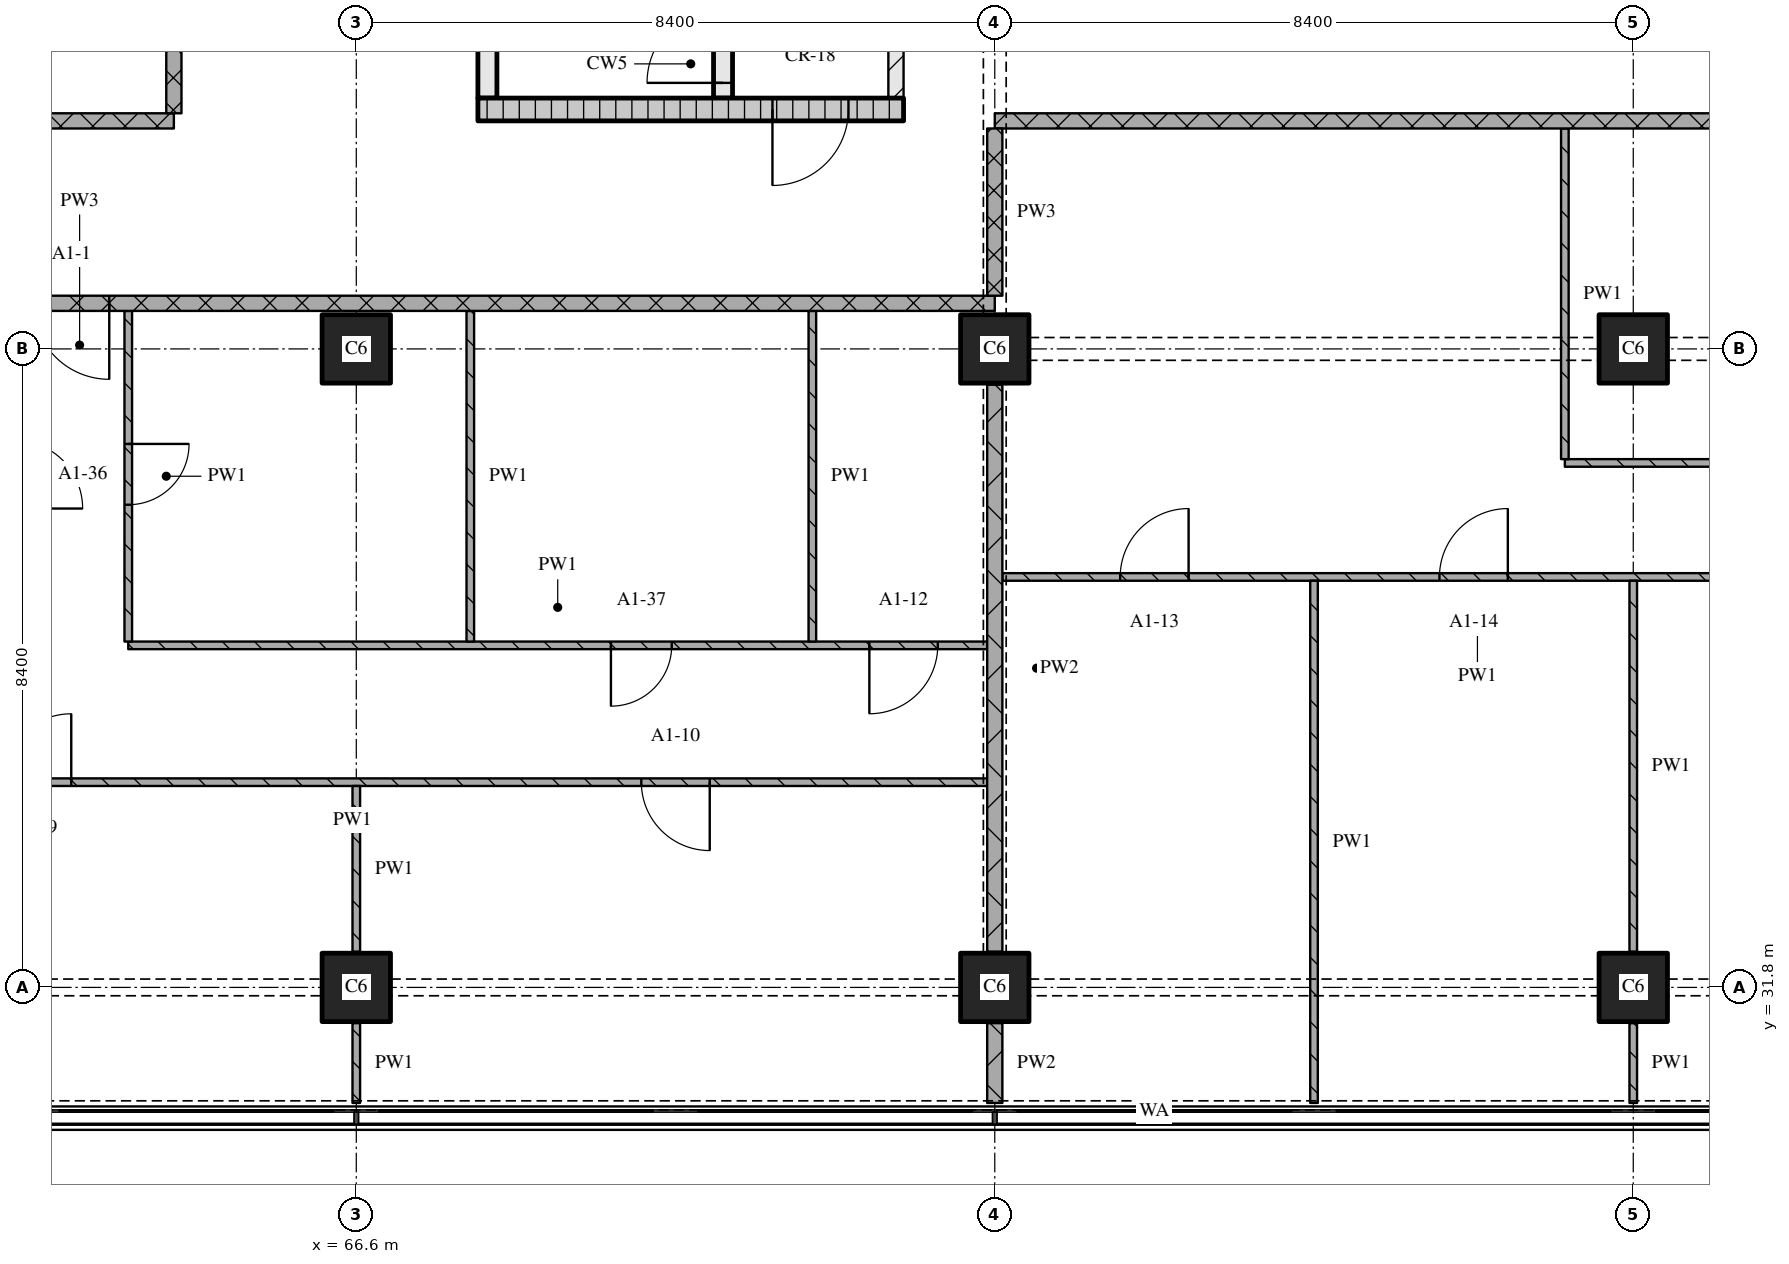
"""IFC4 building model, lengths in metres.
Left out: names, types, materials, properties, quantities, classifications, styles, units other than length and angle.
Written with IfcOpenShell. Run it as: python <this file> out.ifc"""

import sys

from ifc_helpers import new_model, si_unit, direction, frame, frame_2d, origin, origin_2d, place, context, subcontext, project, spatial, rectangle, extrude, element, fill, save


model = new_model("IFC4")
c1 = context("Model", 3, precision=1e-05, world=origin(), true_north=direction((0.0, 1.0)))
c2 = subcontext(c1, "Body", "Model", "MODEL_VIEW")
j1 = project(units=[si_unit("LENGTHUNIT", "METRE"), si_unit("PLANEANGLEUNIT", "RADIAN")], contexts=[c1])
p1 = place(None, origin())
s1 = spatial("IfcSite", under=j1, at=p1, CompositionType="ELEMENT")
p2 = place(p1, origin())
s2 = spatial("IfcBuilding", under=s1, at=p2, CompositionType="ELEMENT")
p3 = place(p2, frame((0.0, 0.0, 40.8)))
s3 = spatial("IfcBuildingStorey", under=s2, at=p3, CompositionType="ELEMENT", Elevation=40.8)
for number, where, z_axis, x_axis in (
    (1, (66.6, 31.8, 0.0), (0.0, 0.0, 1.0), (1.0, 0.0, 0.0)),
    (2, (66.6, 40.2, 0.0), (0.0, 0.0, 1.0), (1.0, 0.0, 0.0)),
    (3, (75.0, 31.8, 0.0), (0.0, 0.0, 1.0), (1.0, 0.0, 0.0)),
    (4, (75.0, 40.2, 0.0), (0.0, 0.0, 1.0), (1.0, 0.0, 0.0)),
    (5, (83.4, 31.8, 0.0), (0.0, 0.0, 1.0), (1.0, 0.0, 0.0)),
    (6, (83.4, 40.2, 0.0), (0.0, 0.0, 1.0), (1.0, 0.0, 0.0)),
):
    element("IfcColumn", number, at=place(p3, frame(where, z_axis=z_axis, x_axis=x_axis)), inside=s3, PredefinedType="COLUMN", context=c2, shape_type="SweptSolid", body=[
        extrude(rectangle(XDim=0.9, YDim=0.9, at=origin_2d()), origin(), (0.0, 0.0, 1.0), 3.6),
    ])
p4 = place(p3, frame((68.2, 43.35, 0.0), z_axis=(0.0, 0.0, 1.0), x_axis=(1.0, 0.0, 0.0)))
e7 = element("IfcWall", 7, at=p4, inside=s3, PredefinedType="SOLIDWALL", context=c2, shape_type="SweptSolid", body=[
    extrude(rectangle(XDim=5.6, YDim=0.3, at=frame_2d((2.8, 0.0))), origin(), (0.0, 0.0, 1.0), 3.32),
])
p5 = place(p4, frame((3.875, 0.0, 0.0)))
e8 = element("IfcOpeningElement", 8, at=p5, cuts=e7, PredefinedType="OPENING", context=c2, shape_type="SweptSolid", body=[
    extrude(rectangle(XDim=1.0, YDim=2.1, at=frame_2d((0.5, 1.05))), frame((0.0, 0.16, 0.0), z_axis=(0.0, -1.0, 0.0), x_axis=(1.0, 0.0, 0.0)), (0.0, 0.0, 1.0), 0.32),
])
p6 = place(p3, frame((68.325, 43.5, 0.0), z_axis=(0.0, 0.0, 1.0), x_axis=(0.0, 1.0, 0.0)))
e9 = element("IfcWall", 9, at=p6, inside=s3, PredefinedType="SOLIDWALL", context=c2, shape_type="SweptSolid", body=[
    extrude(rectangle(XDim=6.9, YDim=0.25, at=frame_2d((3.45, 0.0))), origin(), (0.0, 0.0, 1.0), 3.32),
])
p7 = place(p3, frame((71.425, 43.5, 0.0), z_axis=(0.0, 0.0, 1.0), x_axis=(0.0, 1.0, 0.0)))
e10 = element("IfcWall", 10, at=p7, inside=s3, PredefinedType="SOLIDWALL", context=c2, shape_type="SweptSolid", body=[
    extrude(rectangle(XDim=6.9, YDim=0.25, at=frame_2d((3.45, 0.0))), origin(), (0.0, 0.0, 1.0), 3.32),
])
p8 = place(p7, frame((0.2, 0.0, 0.0)))
e11 = element("IfcOpeningElement", 11, at=p8, cuts=e10, PredefinedType="OPENING", context=c2, shape_type="SweptSolid", body=[
    extrude(rectangle(XDim=1.0, YDim=2.1, at=frame_2d((0.5, 1.05))), frame((0.0, 0.135, 0.0), z_axis=(0.0, -1.0, 0.0), x_axis=(1.0, 0.0, 0.0)), (0.0, 0.0, 1.0), 0.27),
])
p9 = place(p3, frame((73.7, 43.5, 0.0), z_axis=(0.0, 0.0, 1.0), x_axis=(0.0, 1.0, 0.0)))
e12 = element("IfcWall", 12, at=p9, inside=s3, PredefinedType="PARTITIONING", context=c2, shape_type="SweptSolid", body=[
    extrude(rectangle(XDim=6.9, YDim=0.2, at=frame_2d((3.45, 0.0))), origin(), (0.0, 0.0, 1.0), 3.32),
])
p10 = place(p9, frame((1.0, 0.0, 0.0)))
e13 = element("IfcOpeningElement", 13, at=p10, cuts=e12, PredefinedType="OPENING", context=c2, shape_type="SweptSolid", body=[
    extrude(rectangle(XDim=1.0, YDim=2.1, at=frame_2d((0.5, 1.05))), frame((0.0, 0.11, 0.0), z_axis=(0.0, -1.0, 0.0), x_axis=(1.0, 0.0, 0.0)), (0.0, 0.0, 1.0), 0.22),
])
p11 = place(p3, frame((74.9, 34.5, 0.0), z_axis=(0.0, 0.0, 1.0), x_axis=(-1.0, 0.0, 0.0)))
e14 = element("IfcWall", 14, at=p11, inside=s3, PredefinedType="PARTITIONING", context=c2, shape_type="SweptSolid", body=[
    extrude(rectangle(XDim=16.7, YDim=0.1, at=frame_2d((8.35, 0.0))), origin(), (0.0, 0.0, 1.0), 3.32),
])
p12 = place(p11, frame((3.65, 0.0, 0.0)))
e15 = element("IfcOpeningElement", 15, at=p12, cuts=e14, PredefinedType="OPENING", context=c2, shape_type="SweptSolid", body=[
    extrude(rectangle(XDim=0.9, YDim=2.1, at=frame_2d((0.45, 1.05))), frame((0.0, 0.06, 0.0), z_axis=(0.0, -1.0, 0.0), x_axis=(1.0, 0.0, 0.0)), (0.0, 0.0, 1.0), 0.12),
])
p13 = place(p11, frame((12.05, 0.0, 0.0)))
e16 = element("IfcOpeningElement", 16, at=p13, cuts=e14, PredefinedType="OPENING", context=c2, shape_type="SweptSolid", body=[
    extrude(rectangle(XDim=0.9, YDim=2.1, at=frame_2d((0.45, 1.05))), frame((0.0, 0.06, 0.0), z_axis=(0.0, -1.0, 0.0), x_axis=(1.0, 0.0, 0.0)), (0.0, 0.0, 1.0), 0.12),
])
p14 = place(p3, frame((63.6, 36.3, 0.0), z_axis=(0.0, 0.0, 1.0), x_axis=(1.0, 0.0, 0.0)))
e17 = element("IfcWall", 17, at=p14, inside=s3, PredefinedType="PARTITIONING", context=c2, shape_type="SweptSolid", body=[
    extrude(rectangle(XDim=11.3, YDim=0.1, at=frame_2d((5.65, 0.0))), origin(), (0.0, 0.0, 1.0), 3.32),
])
p15 = place(p14, frame((6.35, 0.0, 0.0)))
e18 = element("IfcOpeningElement", 18, at=p15, cuts=e17, PredefinedType="OPENING", context=c2, shape_type="SweptSolid", body=[
    extrude(rectangle(XDim=0.8, YDim=2.1, at=frame_2d((0.4, 1.05))), frame((0.0, 0.06, 0.0), z_axis=(0.0, -1.0, 0.0), x_axis=(1.0, 0.0, 0.0)), (0.0, 0.0, 1.0), 0.12),
])
p16 = place(p14, frame((9.75, 0.0, 0.0)))
e19 = element("IfcOpeningElement", 19, at=p16, cuts=e17, PredefinedType="OPENING", context=c2, shape_type="SweptSolid", body=[
    extrude(rectangle(XDim=0.9, YDim=2.1, at=frame_2d((0.45, 1.05))), frame((0.0, 0.06, 0.0), z_axis=(0.0, -1.0, 0.0), x_axis=(1.0, 0.0, 0.0)), (0.0, 0.0, 1.0), 0.12),
])
p17 = place(p3, frame((87.6, 37.2, 0.0), z_axis=(0.0, 0.0, 1.0), x_axis=(-1.0, 0.0, 0.0)))
e20 = element("IfcWall", 20, at=p17, inside=s3, PredefinedType="PARTITIONING", context=c2, shape_type="SweptSolid", body=[
    extrude(rectangle(XDim=12.5, YDim=0.1, at=frame_2d((6.25, 0.0))), origin(), (0.0, 0.0, 1.0), 3.32),
])
p18 = place(p17, frame((5.85, 0.0, 0.0)))
e21 = element("IfcOpeningElement", 21, at=p18, cuts=e20, PredefinedType="OPENING", context=c2, shape_type="SweptSolid", body=[
    extrude(rectangle(XDim=0.9, YDim=2.1, at=frame_2d((0.45, 1.05))), frame((0.0, 0.06, 0.0), z_axis=(0.0, -1.0, 0.0), x_axis=(1.0, 0.0, 0.0)), (0.0, 0.0, 1.0), 0.12),
])
p19 = place(p17, frame((10.05, 0.0, 0.0)))
e22 = element("IfcOpeningElement", 22, at=p19, cuts=e20, PredefinedType="OPENING", context=c2, shape_type="SweptSolid", body=[
    extrude(rectangle(XDim=0.9, YDim=2.1, at=frame_2d((0.45, 1.05))), frame((0.0, 0.06, 0.0), z_axis=(0.0, -1.0, 0.0), x_axis=(1.0, 0.0, 0.0)), (0.0, 0.0, 1.0), 0.12),
])
p20 = place(p3, frame((82.5, 38.7, 0.0), z_axis=(0.0, 0.0, 1.0), x_axis=(1.0, 0.0, 0.0)))
e23 = element("IfcWall", 23, at=p20, inside=s3, PredefinedType="PARTITIONING", context=c2, shape_type="SweptSolid", body=[
    extrude(rectangle(XDim=9.9, YDim=0.1, at=frame_2d((4.95, 0.0))), origin(), (0.0, 0.0, 1.0), 3.32),
])
p21 = place(p3, frame((75.0, 40.8, 0.0), z_axis=(0.0, 0.0, 1.0), x_axis=(-1.0, 0.0, 0.0)))
e24 = element("IfcWall", 24, at=p21, inside=s3, PredefinedType="PARTITIONING", context=c2, shape_type="SweptSolid", body=[
    extrude(rectangle(XDim=24.08, YDim=0.2, at=frame_2d((12.04, 0.0))), origin(), (0.0, 0.0, 1.0), 3.32),
])
p22 = place(p21, frame((11.65, 0.0, 0.0)))
e25 = element("IfcOpeningElement", 25, at=p22, cuts=e24, PredefinedType="OPENING", context=c2, shape_type="SweptSolid", body=[
    extrude(rectangle(XDim=1.0, YDim=2.1, at=frame_2d((0.5, 1.05))), frame((0.0, 0.11, 0.0), z_axis=(0.0, -1.0, 0.0), x_axis=(1.0, 0.0, 0.0)), (0.0, 0.0, 1.0), 0.22),
])
p23 = place(p3, frame((48.28, 43.2, 0.0), z_axis=(0.0, 0.0, 1.0), x_axis=(1.0, 0.0, 0.0)))
e26 = element("IfcWall", 26, at=p23, inside=s3, PredefinedType="PARTITIONING", context=c2, shape_type="SweptSolid", body=[
    extrude(rectangle(XDim=15.92, YDim=0.2, at=frame_2d((7.96, 0.0))), origin(), (0.0, 0.0, 1.0), 3.32),
])
p24 = place(p3, frame((100.2, 43.2, 0.0), z_axis=(0.0, 0.0, 1.0), x_axis=(-1.0, 0.0, 0.0)))
e27 = element("IfcWall", 27, at=p24, inside=s3, PredefinedType="PARTITIONING", context=c2, shape_type="SweptSolid", body=[
    extrude(rectangle(XDim=25.2, YDim=0.2, at=frame_2d((12.6, 0.0))), origin(), (0.0, 0.0, 1.0), 3.32),
])
p25 = place(p24, frame((6.55, 0.0, 0.0)))
e28 = element("IfcOpeningElement", 28, at=p25, cuts=e27, PredefinedType="OPENING", context=c2, shape_type="SweptSolid", body=[
    extrude(rectangle(XDim=1.0, YDim=2.1, at=frame_2d((0.5, 1.05))), frame((0.0, 0.11, 0.0), z_axis=(0.0, -1.0, 0.0), x_axis=(1.0, 0.0, 0.0)), (0.0, 0.0, 1.0), 0.22),
])
p26 = place(p3, frame((63.6, 40.7, 0.0), z_axis=(0.0, 0.0, 1.0), x_axis=(0.0, -1.0, 0.0)))
e29 = element("IfcWall", 29, at=p26, inside=s3, PredefinedType="PARTITIONING", context=c2, shape_type="SweptSolid", body=[
    extrude(rectangle(XDim=4.35, YDim=0.1, at=frame_2d((2.175, 0.0))), origin(), (0.0, 0.0, 1.0), 3.32),
])
p27 = place(p26, frame((1.75, 0.0, 0.0)))
e30 = element("IfcOpeningElement", 30, at=p27, cuts=e29, PredefinedType="OPENING", context=c2, shape_type="SweptSolid", body=[
    extrude(rectangle(XDim=0.8, YDim=2.1, at=frame_2d((0.4, 1.05))), frame((0.0, 0.06, 0.0), z_axis=(0.0, -1.0, 0.0), x_axis=(1.0, 0.0, 0.0)), (0.0, 0.0, 1.0), 0.12),
])
p28 = place(p3, frame((64.2, 43.3, 0.0), z_axis=(0.0, 0.0, 1.0), x_axis=(0.0, 1.0, 0.0)))
e31 = element("IfcWall", 31, at=p28, inside=s3, PredefinedType="PARTITIONING", context=c2, shape_type="SweptSolid", body=[
    extrude(rectangle(XDim=32.02, YDim=0.2, at=frame_2d((16.01, 0.0))), origin(), (0.0, 0.0, 1.0), 3.32),
])
p29 = place(p28, frame((8.55, 0.0, 0.0)))
e32 = element("IfcOpeningElement", 32, at=p29, cuts=e31, PredefinedType="OPENING", context=c2, shape_type="SweptSolid", body=[
    extrude(rectangle(XDim=1.0, YDim=2.1, at=frame_2d((0.5, 1.05))), frame((0.0, 0.11, 0.0), z_axis=(0.0, -1.0, 0.0), x_axis=(1.0, 0.0, 0.0)), (0.0, 0.0, 1.0), 0.22),
])
p30 = place(p28, frame((25.95, 0.0, 0.0)))
e33 = element("IfcOpeningElement", 33, at=p30, cuts=e31, PredefinedType="OPENING", context=c2, shape_type="SweptSolid", body=[
    extrude(rectangle(XDim=1.0, YDim=2.1, at=frame_2d((0.5, 1.05))), frame((0.0, 0.11, 0.0), z_axis=(0.0, -1.0, 0.0), x_axis=(1.0, 0.0, 0.0)), (0.0, 0.0, 1.0), 0.22),
])
p31 = place(p3, frame((66.6, 31.33, 0.0), z_axis=(0.0, 0.0, 1.0), x_axis=(0.0, -1.0, 0.0)))
e34 = element("IfcWall", 34, at=p31, inside=s3, PredefinedType="PARTITIONING", context=c2, shape_type="SweptSolid", body=[
    extrude(rectangle(XDim=1.05, YDim=0.1, at=frame_2d((0.525, 0.0))), origin(), (0.0, 0.0, 1.0), 3.32),
])
p32 = place(p3, frame((66.6, 34.45, 0.0), z_axis=(0.0, 0.0, 1.0), x_axis=(0.0, -1.0, 0.0)))
e35 = element("IfcWall", 35, at=p32, inside=s3, PredefinedType="PARTITIONING", context=c2, shape_type="SweptSolid", body=[
    extrude(rectangle(XDim=2.18, YDim=0.1, at=frame_2d((1.09, 0.0))), origin(), (0.0, 0.0, 1.0), 3.32),
])
for number, where, z_axis, x_axis in (
    (36, (68.1, 40.7, 0.0), (0.0, 0.0, 1.0), (0.0, -1.0, 0.0)),
    (37, (72.6, 40.7, 0.0), (0.0, 0.0, 1.0), (0.0, -1.0, 0.0)),
):
    element("IfcWall", number, at=place(p3, frame(where, z_axis=z_axis, x_axis=x_axis)), inside=s3, PredefinedType="PARTITIONING", context=c2, shape_type="SweptSolid", body=[
        extrude(rectangle(XDim=4.35, YDim=0.1, at=frame_2d((2.175, 0.0))), origin(), (0.0, 0.0, 1.0), 3.32),
    ])
p33 = place(p3, frame((75.0, 43.1, 0.0), z_axis=(0.0, 0.0, 1.0), x_axis=(0.0, -1.0, 0.0)))
e38 = element("IfcWall", 38, at=p33, inside=s3, PredefinedType="PARTITIONING", context=c2, shape_type="SweptSolid", body=[
    extrude(rectangle(XDim=2.2, YDim=0.2, at=frame_2d((1.1, 0.0))), origin(), (0.0, 0.0, 1.0), 2.43),
])
p34 = place(p3, frame((75.0, 31.33, 0.0), z_axis=(0.0, 0.0, 1.0), x_axis=(0.0, -1.0, 0.0)))
e39 = element("IfcWall", 39, at=p34, inside=s3, PredefinedType="PARTITIONING", context=c2, shape_type="SweptSolid", body=[
    extrude(rectangle(XDim=1.05, YDim=0.2, at=frame_2d((0.525, 0.0))), origin(), (0.0, 0.0, 1.0), 3.32),
])
p35 = place(p3, frame((75.0, 39.73, 0.0), z_axis=(0.0, 0.0, 1.0), x_axis=(0.0, -1.0, 0.0)))
e40 = element("IfcWall", 40, at=p35, inside=s3, PredefinedType="PARTITIONING", context=c2, shape_type="SweptSolid", body=[
    extrude(rectangle(XDim=7.46, YDim=0.2, at=frame_2d((3.73, 0.0))), origin(), (0.0, 0.0, 1.0), 2.83),
])
p36 = place(p3, frame((79.2, 37.15, 0.0), z_axis=(0.0, 0.0, 1.0), x_axis=(0.0, -1.0, 0.0)))
e41 = element("IfcWall", 41, at=p36, inside=s3, PredefinedType="PARTITIONING", context=c2, shape_type="SweptSolid", body=[
    extrude(rectangle(XDim=6.87, YDim=0.1, at=frame_2d((3.435, 0.0))), origin(), (0.0, 0.0, 1.0), 3.32),
])
p37 = place(p3, frame((82.5, 43.1, 0.0), z_axis=(0.0, 0.0, 1.0), x_axis=(0.0, -1.0, 0.0)))
e42 = element("IfcWall", 42, at=p37, inside=s3, PredefinedType="PARTITIONING", context=c2, shape_type="SweptSolid", body=[
    extrude(rectangle(XDim=4.35, YDim=0.1, at=frame_2d((2.175, 0.0))), origin(), (0.0, 0.0, 1.0), 3.32),
])
p38 = place(p3, frame((83.4, 31.33, 0.0), z_axis=(0.0, 0.0, 1.0), x_axis=(0.0, -1.0, 0.0)))
e43 = element("IfcWall", 43, at=p38, inside=s3, PredefinedType="PARTITIONING", context=c2, shape_type="SweptSolid", body=[
    extrude(rectangle(XDim=1.05, YDim=0.1, at=frame_2d((0.525, 0.0))), origin(), (0.0, 0.0, 1.0), 3.32),
])
p39 = place(p3, frame((83.4, 37.15, 0.0), z_axis=(0.0, 0.0, 1.0), x_axis=(0.0, -1.0, 0.0)))
e44 = element("IfcWall", 44, at=p39, inside=s3, PredefinedType="PARTITIONING", context=c2, shape_type="SweptSolid", body=[
    extrude(rectangle(XDim=4.88, YDim=0.1, at=frame_2d((2.44, 0.0))), origin(), (0.0, 0.0, 1.0), 3.32),
])
p40 = place(p5, origin())
e45 = element("IfcDoor", 45, at=p40, inside=s3, OperationType="SINGLE_SWING_RIGHT", PredefinedType="DOOR", context=c2, shape_type="SweptSolid", body=[
    extrude(rectangle(XDim=1.0, YDim=2.1, at=frame_2d((0.5, 1.05))), frame((0.0, 0.025, 0.0), z_axis=(0.0, -1.0, 0.0), x_axis=(1.0, 0.0, 0.0)), (0.0, 0.0, 1.0), 0.05),
])
fill(e8, e45)
p41 = place(p8, origin())
e46 = element("IfcDoor", 46, at=p41, inside=s3, OperationType="SINGLE_SWING_LEFT", PredefinedType="DOOR", context=c2, shape_type="SweptSolid", body=[
    extrude(rectangle(XDim=1.0, YDim=2.1, at=frame_2d((0.5, 1.05))), frame((0.0, 0.025, 0.0), z_axis=(0.0, -1.0, 0.0), x_axis=(1.0, 0.0, 0.0)), (0.0, 0.0, 1.0), 0.05),
])
fill(e11, e46)
p42 = place(p12, origin())
e47 = element("IfcDoor", 47, at=p42, inside=s3, OperationType="SINGLE_SWING_LEFT", PredefinedType="DOOR", context=c2, shape_type="SweptSolid", body=[
    extrude(rectangle(XDim=0.9, YDim=2.1, at=frame_2d((0.45, 1.05))), frame((0.0, 0.025, 0.0), z_axis=(0.0, -1.0, 0.0), x_axis=(1.0, 0.0, 0.0)), (0.0, 0.0, 1.0), 0.05),
])
fill(e15, e47)
p43 = place(p13, origin())
e48 = element("IfcDoor", 48, at=p43, inside=s3, OperationType="SINGLE_SWING_RIGHT", PredefinedType="DOOR", context=c2, shape_type="SweptSolid", body=[
    extrude(rectangle(XDim=0.9, YDim=2.1, at=frame_2d((0.45, 1.05))), frame((0.0, 0.025, 0.0), z_axis=(0.0, -1.0, 0.0), x_axis=(1.0, 0.0, 0.0)), (0.0, 0.0, 1.0), 0.05),
])
fill(e16, e48)
p44 = place(p15, origin())
e49 = element("IfcDoor", 49, at=p44, inside=s3, OperationType="SINGLE_SWING_RIGHT", PredefinedType="DOOR", context=c2, shape_type="SweptSolid", body=[
    extrude(rectangle(XDim=0.8, YDim=2.1, at=frame_2d((0.4, 1.05))), frame((0.0, 0.025, 0.0), z_axis=(0.0, -1.0, 0.0), x_axis=(1.0, 0.0, 0.0)), (0.0, 0.0, 1.0), 0.05),
])
fill(e18, e49)
p45 = place(p16, origin())
e50 = element("IfcDoor", 50, at=p45, inside=s3, OperationType="SINGLE_SWING_RIGHT", PredefinedType="DOOR", context=c2, shape_type="SweptSolid", body=[
    extrude(rectangle(XDim=0.9, YDim=2.1, at=frame_2d((0.45, 1.05))), frame((0.0, 0.025, 0.0), z_axis=(0.0, -1.0, 0.0), x_axis=(1.0, 0.0, 0.0)), (0.0, 0.0, 1.0), 0.05),
])
fill(e19, e50)
p46 = place(p18, origin())
e51 = element("IfcDoor", 51, at=p46, inside=s3, OperationType="SINGLE_SWING_RIGHT", PredefinedType="DOOR", context=c2, shape_type="SweptSolid", body=[
    extrude(rectangle(XDim=0.9, YDim=2.1, at=frame_2d((0.45, 1.05))), frame((0.0, 0.025, 0.0), z_axis=(0.0, -1.0, 0.0), x_axis=(1.0, 0.0, 0.0)), (0.0, 0.0, 1.0), 0.05),
])
fill(e21, e51)
p47 = place(p19, origin())
e52 = element("IfcDoor", 52, at=p47, inside=s3, OperationType="SINGLE_SWING_RIGHT", PredefinedType="DOOR", context=c2, shape_type="SweptSolid", body=[
    extrude(rectangle(XDim=0.9, YDim=2.1, at=frame_2d((0.45, 1.05))), frame((0.0, 0.025, 0.0), z_axis=(0.0, -1.0, 0.0), x_axis=(1.0, 0.0, 0.0)), (0.0, 0.0, 1.0), 0.05),
])
fill(e22, e52)
p48 = place(p22, origin())
e53 = element("IfcDoor", 53, at=p48, inside=s3, OperationType="SINGLE_SWING_LEFT", PredefinedType="DOOR", context=c2, shape_type="SweptSolid", body=[
    extrude(rectangle(XDim=1.0, YDim=2.1, at=frame_2d((0.5, 1.05))), frame((0.0, 0.025, 0.0), z_axis=(0.0, -1.0, 0.0), x_axis=(1.0, 0.0, 0.0)), (0.0, 0.0, 1.0), 0.05),
])
fill(e25, e53)
p49 = place(p27, origin())
e54 = element("IfcDoor", 54, at=p49, inside=s3, OperationType="SINGLE_SWING_LEFT", PredefinedType="DOOR", context=c2, shape_type="SweptSolid", body=[
    extrude(rectangle(XDim=0.8, YDim=2.1, at=frame_2d((0.4, 1.05))), frame((0.0, 0.025, 0.0), z_axis=(0.0, -1.0, 0.0), x_axis=(1.0, 0.0, 0.0)), (0.0, 0.0, 1.0), 0.05),
])
fill(e30, e54)
save(model, sys.argv[1])
